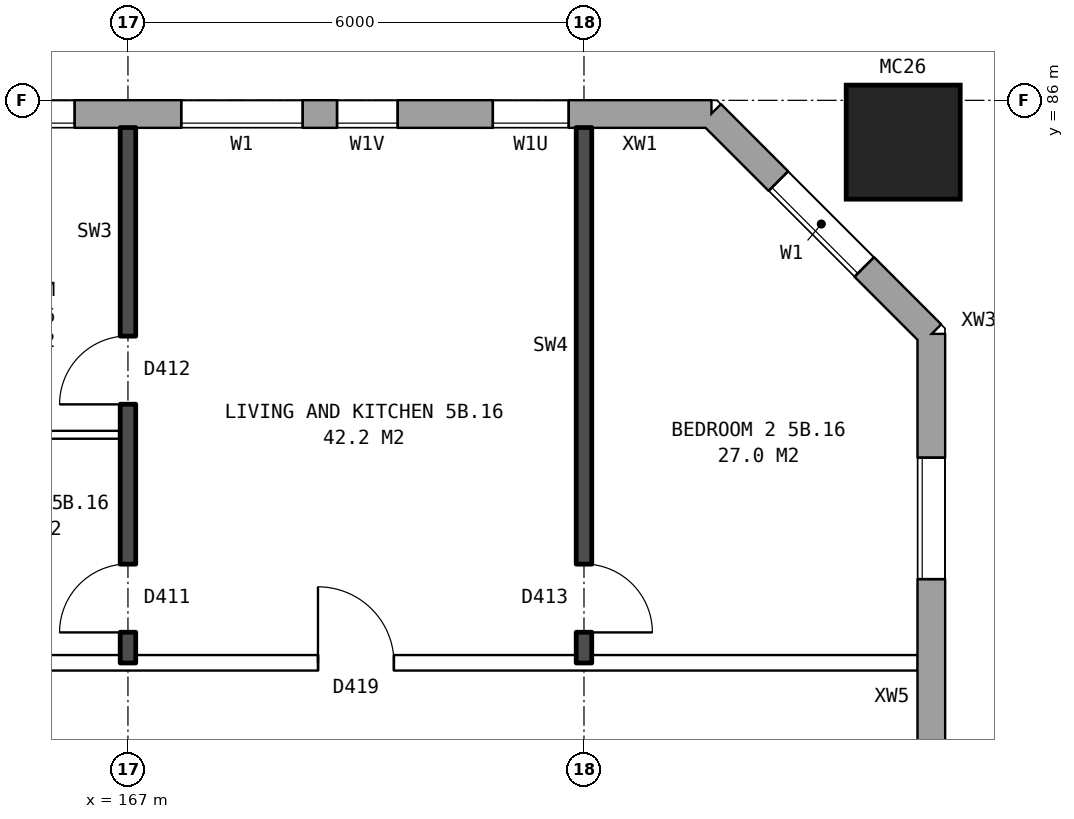
"""IFC4 building model, lengths in metres.
Left out: names, types, materials, properties, quantities, classifications, styles, units other than length and angle.
Written with IfcOpenShell. Run it as: python <this file> out.ifc"""

import sys

from ifc_helpers import new_model, si_unit, direction, frame, frame_2d, origin, origin_2d, place, context, subcontext, project, spatial, rectangle, hollow_rectangle, extrude, element, fill, save


model = new_model("IFC4")
c1 = context("Model", 3, precision=1e-05, world=origin(), true_north=direction((0.0, 1.0)))
c2 = subcontext(c1, "Body", "Model", "MODEL_VIEW")
j1 = project(units=[si_unit("LENGTHUNIT", "METRE"), si_unit("PLANEANGLEUNIT", "RADIAN")], contexts=[c1])
p1 = place(None, origin())
s1 = spatial("IfcSite", under=j1, at=p1, CompositionType="ELEMENT")
p2 = place(p1, origin())
s2 = spatial("IfcBuilding", under=s1, at=p2, CompositionType="ELEMENT")
p3 = place(p2, frame((0.0, 0.0, 22.6)))
s3 = spatial("IfcBuildingStorey", under=s2, at=p3, CompositionType="ELEMENT", Elevation=22.6)
p4 = place(p3, frame((177.2, 85.45, 0.0), z_axis=(0.0, 0.0, 1.0), x_axis=(1.0, 0.0, 0.0)))
e1 = element("IfcColumn", 1, at=p4, inside=s3, PredefinedType="COLUMN", context=c2, shape_type="SweptSolid", body=[
    extrude(hollow_rectangle(XDim=1.5, YDim=1.5, WallThickness=0.08, at=origin_2d()), origin(), (0.0, 0.0, 1.0), 3.1),
])
p5 = place(p3, frame((177.57, 57.075, 0.0), z_axis=(0.0, 0.0, 1.0), x_axis=(0.0, 1.0, 0.0)))
e2 = element("IfcWall", 2, at=p5, inside=s3, PredefinedType="STANDARD", context=c2, shape_type="SweptSolid", body=[
    extrude(rectangle(XDim=25.851, YDim=0.36, at=frame_2d((12.925, 0.0))), origin(), (0.0, 0.0, 1.0), 2.85),
])
p6 = place(p5, frame((1.625, 0.0, 0.8)))
e3 = element("IfcOpeningElement", 3, at=p6, cuts=e2, PredefinedType="OPENING", context=c2, shape_type="SweptSolid", body=[
    extrude(rectangle(XDim=1.6, YDim=1.8, at=frame_2d((0.8, 0.9))), frame((0.0, 0.19, 0.0), z_axis=(0.0, -1.0, 0.0), x_axis=(1.0, 0.0, 0.0)), (0.0, 0.0, 1.0), 0.38),
])
p7 = place(p5, frame((6.225, 0.0, 0.8)))
e4 = element("IfcOpeningElement", 4, at=p7, cuts=e2, PredefinedType="OPENING", context=c2, shape_type="SweptSolid", body=[
    extrude(rectangle(XDim=1.0, YDim=0.9, at=frame_2d((0.5, 0.45))), frame((0.0, 0.19, 0.0), z_axis=(0.0, -1.0, 0.0), x_axis=(1.0, 0.0, 0.0)), (0.0, 0.0, 1.0), 0.38),
])
p8 = place(p5, frame((7.625, 0.0, 0.8)))
e5 = element("IfcOpeningElement", 5, at=p8, cuts=e2, PredefinedType="OPENING", context=c2, shape_type="SweptSolid", body=[
    extrude(rectangle(XDim=1.6, YDim=1.8, at=frame_2d((0.8, 0.9))), frame((0.0, 0.19, 0.0), z_axis=(0.0, -1.0, 0.0), x_axis=(1.0, 0.0, 0.0)), (0.0, 0.0, 1.0), 0.38),
])
p9 = place(p5, frame((10.625, 0.0, 0.8)))
e6 = element("IfcOpeningElement", 6, at=p9, cuts=e2, PredefinedType="OPENING", context=c2, shape_type="SweptSolid", body=[
    extrude(rectangle(XDim=1.6, YDim=1.8, at=frame_2d((0.8, 0.9))), frame((0.0, 0.19, 0.0), z_axis=(0.0, -1.0, 0.0), x_axis=(1.0, 0.0, 0.0)), (0.0, 0.0, 1.0), 0.38),
])
p10 = place(p5, frame((13.625, 0.0, 0.8)))
e7 = element("IfcOpeningElement", 7, at=p10, cuts=e2, PredefinedType="OPENING", context=c2, shape_type="SweptSolid", body=[
    extrude(rectangle(XDim=1.6, YDim=1.8, at=frame_2d((0.8, 0.9))), frame((0.0, 0.19, 0.0), z_axis=(0.0, -1.0, 0.0), x_axis=(1.0, 0.0, 0.0)), (0.0, 0.0, 1.0), 0.38),
])
p11 = place(p5, frame((16.625, 0.0, 0.8)))
e8 = element("IfcOpeningElement", 8, at=p11, cuts=e2, PredefinedType="OPENING", context=c2, shape_type="SweptSolid", body=[
    extrude(rectangle(XDim=1.6, YDim=1.8, at=frame_2d((0.8, 0.9))), frame((0.0, 0.19, 0.0), z_axis=(0.0, -1.0, 0.0), x_axis=(1.0, 0.0, 0.0)), (0.0, 0.0, 1.0), 0.38),
])
p12 = place(p5, frame((9.525, 0.0, 0.8)))
e9 = element("IfcOpeningElement", 9, at=p12, cuts=e2, PredefinedType="OPENING", context=c2, shape_type="SweptSolid", body=[
    extrude(rectangle(XDim=0.8, YDim=1.8, at=frame_2d((0.4, 0.9))), frame((0.0, 0.19, 0.0), z_axis=(0.0, -1.0, 0.0), x_axis=(1.0, 0.0, 0.0)), (0.0, 0.0, 1.0), 0.38),
])
p13 = place(p5, frame((22.625, 0.0, 0.8)))
e10 = element("IfcOpeningElement", 10, at=p13, cuts=e2, PredefinedType="OPENING", context=c2, shape_type="SweptSolid", body=[
    extrude(rectangle(XDim=1.6, YDim=1.8, at=frame_2d((0.8, 0.9))), frame((0.0, 0.19, 0.0), z_axis=(0.0, -1.0, 0.0), x_axis=(1.0, 0.0, 0.0)), (0.0, 0.0, 1.0), 0.38),
])
p14 = place(p5, frame((12.525, 0.0, 0.8)))
e11 = element("IfcOpeningElement", 11, at=p14, cuts=e2, PredefinedType="OPENING", context=c2, shape_type="SweptSolid", body=[
    extrude(rectangle(XDim=0.8, YDim=1.8, at=frame_2d((0.4, 0.9))), frame((0.0, 0.19, 0.0), z_axis=(0.0, -1.0, 0.0), x_axis=(1.0, 0.0, 0.0)), (0.0, 0.0, 1.0), 0.38),
])
p15 = place(p5, frame((15.525, 0.0, 0.8)))
e12 = element("IfcOpeningElement", 12, at=p15, cuts=e2, PredefinedType="OPENING", context=c2, shape_type="SweptSolid", body=[
    extrude(rectangle(XDim=0.8, YDim=1.8, at=frame_2d((0.4, 0.9))), frame((0.0, 0.19, 0.0), z_axis=(0.0, -1.0, 0.0), x_axis=(1.0, 0.0, 0.0)), (0.0, 0.0, 1.0), 0.38),
])
p16 = place(p5, frame((18.525, 0.0, 0.8)))
e13 = element("IfcOpeningElement", 13, at=p16, cuts=e2, PredefinedType="OPENING", context=c2, shape_type="SweptSolid", body=[
    extrude(rectangle(XDim=1.0, YDim=0.9, at=frame_2d((0.5, 0.45))), frame((0.0, 0.19, 0.0), z_axis=(0.0, -1.0, 0.0), x_axis=(1.0, 0.0, 0.0)), (0.0, 0.0, 1.0), 0.38),
])
p17 = place(p3, frame((177.57, 82.925, 0.0), z_axis=(0.0, 0.0, 1.0), x_axis=(-0.707106781187, 0.707106781187, 0.0)))
e14 = element("IfcWall", 14, at=p17, inside=s3, PredefinedType="STANDARD", context=c2, shape_type="SweptSolid", body=[
    extrude(rectangle(XDim=4.094, YDim=0.36, at=frame_2d((2.047, 0.0))), origin(), (0.0, 0.0, 1.0), 2.85),
])
p18 = place(p17, frame((1.247, 0.0, 0.8)))
e15 = element("IfcOpeningElement", 15, at=p18, cuts=e14, PredefinedType="OPENING", context=c2, shape_type="SweptSolid", body=[
    extrude(rectangle(XDim=1.6, YDim=1.8, at=frame_2d((0.8, 0.9))), frame((0.0, 0.19, 0.0), z_axis=(0.0, -1.0, 0.0), x_axis=(1.0, 0.0, 0.0)), (0.0, 0.0, 1.0), 0.38),
])
p19 = place(p3, frame((174.675, 85.82, 0.0), z_axis=(0.0, 0.0, 1.0), x_axis=(-1.0, 0.0, 0.0)))
e16 = element("IfcWall", 16, at=p19, inside=s3, PredefinedType="STANDARD", context=c2, shape_type="SweptSolid", body=[
    extrude(rectangle(XDim=40.601, YDim=0.36, at=frame_2d((20.3, 0.0))), origin(), (0.0, 0.0, 1.0), 2.85),
])
p20 = place(p19, frame((1.875, 0.0, 1.7)))
e17 = element("IfcOpeningElement", 17, at=p20, cuts=e16, PredefinedType="OPENING", context=c2, shape_type="SweptSolid", body=[
    extrude(rectangle(XDim=1.0, YDim=0.9, at=frame_2d((0.5, 0.45))), frame((0.0, 0.19, 0.0), z_axis=(0.0, -1.0, 0.0), x_axis=(1.0, 0.0, 0.0)), (0.0, 0.0, 1.0), 0.38),
])
p21 = place(p19, frame((5.375, 0.0, 0.8)))
e18 = element("IfcOpeningElement", 18, at=p21, cuts=e16, PredefinedType="OPENING", context=c2, shape_type="SweptSolid", body=[
    extrude(rectangle(XDim=1.6, YDim=1.8, at=frame_2d((0.8, 0.9))), frame((0.0, 0.19, 0.0), z_axis=(0.0, -1.0, 0.0), x_axis=(1.0, 0.0, 0.0)), (0.0, 0.0, 1.0), 0.38),
])
p22 = place(p19, frame((8.375, 0.0, 0.8)))
e19 = element("IfcOpeningElement", 19, at=p22, cuts=e16, PredefinedType="OPENING", context=c2, shape_type="SweptSolid", body=[
    extrude(rectangle(XDim=1.6, YDim=1.8, at=frame_2d((0.8, 0.9))), frame((0.0, 0.19, 0.0), z_axis=(0.0, -1.0, 0.0), x_axis=(1.0, 0.0, 0.0)), (0.0, 0.0, 1.0), 0.38),
])
p23 = place(p19, frame((11.375, 0.0, 0.8)))
e20 = element("IfcOpeningElement", 20, at=p23, cuts=e16, PredefinedType="OPENING", context=c2, shape_type="SweptSolid", body=[
    extrude(rectangle(XDim=1.6, YDim=1.8, at=frame_2d((0.8, 0.9))), frame((0.0, 0.19, 0.0), z_axis=(0.0, -1.0, 0.0), x_axis=(1.0, 0.0, 0.0)), (0.0, 0.0, 1.0), 0.38),
])
p24 = place(p19, frame((14.375, 0.0, 0.8)))
e21 = element("IfcOpeningElement", 21, at=p24, cuts=e16, PredefinedType="OPENING", context=c2, shape_type="SweptSolid", body=[
    extrude(rectangle(XDim=1.6, YDim=1.8, at=frame_2d((0.8, 0.9))), frame((0.0, 0.19, 0.0), z_axis=(0.0, -1.0, 0.0), x_axis=(1.0, 0.0, 0.0)), (0.0, 0.0, 1.0), 0.38),
])
p25 = place(p19, frame((17.375, 0.0, 0.8)))
e22 = element("IfcOpeningElement", 22, at=p25, cuts=e16, PredefinedType="OPENING", context=c2, shape_type="SweptSolid", body=[
    extrude(rectangle(XDim=1.6, YDim=1.8, at=frame_2d((0.8, 0.9))), frame((0.0, 0.19, 0.0), z_axis=(0.0, -1.0, 0.0), x_axis=(1.0, 0.0, 0.0)), (0.0, 0.0, 1.0), 0.38),
])
p26 = place(p19, frame((20.375, 0.0, 0.8)))
e23 = element("IfcOpeningElement", 23, at=p26, cuts=e16, PredefinedType="OPENING", context=c2, shape_type="SweptSolid", body=[
    extrude(rectangle(XDim=1.6, YDim=1.8, at=frame_2d((0.8, 0.9))), frame((0.0, 0.19, 0.0), z_axis=(0.0, -1.0, 0.0), x_axis=(1.0, 0.0, 0.0)), (0.0, 0.0, 1.0), 0.38),
])
p27 = place(p19, frame((23.375, 0.0, 0.8)))
e24 = element("IfcOpeningElement", 24, at=p27, cuts=e16, PredefinedType="OPENING", context=c2, shape_type="SweptSolid", body=[
    extrude(rectangle(XDim=1.6, YDim=1.8, at=frame_2d((0.8, 0.9))), frame((0.0, 0.19, 0.0), z_axis=(0.0, -1.0, 0.0), x_axis=(1.0, 0.0, 0.0)), (0.0, 0.0, 1.0), 0.38),
])
p28 = place(p19, frame((26.375, 0.0, 0.8)))
e25 = element("IfcOpeningElement", 25, at=p28, cuts=e16, PredefinedType="OPENING", context=c2, shape_type="SweptSolid", body=[
    extrude(rectangle(XDim=1.6, YDim=1.8, at=frame_2d((0.8, 0.9))), frame((0.0, 0.19, 0.0), z_axis=(0.0, -1.0, 0.0), x_axis=(1.0, 0.0, 0.0)), (0.0, 0.0, 1.0), 0.38),
])
p29 = place(p19, frame((29.375, 0.0, 0.8)))
e26 = element("IfcOpeningElement", 26, at=p29, cuts=e16, PredefinedType="OPENING", context=c2, shape_type="SweptSolid", body=[
    extrude(rectangle(XDim=1.6, YDim=1.8, at=frame_2d((0.8, 0.9))), frame((0.0, 0.19, 0.0), z_axis=(0.0, -1.0, 0.0), x_axis=(1.0, 0.0, 0.0)), (0.0, 0.0, 1.0), 0.38),
])
p30 = place(p19, frame((32.375, 0.0, 0.8)))
e27 = element("IfcOpeningElement", 27, at=p30, cuts=e16, PredefinedType="OPENING", context=c2, shape_type="SweptSolid", body=[
    extrude(rectangle(XDim=1.6, YDim=1.8, at=frame_2d((0.8, 0.9))), frame((0.0, 0.19, 0.0), z_axis=(0.0, -1.0, 0.0), x_axis=(1.0, 0.0, 0.0)), (0.0, 0.0, 1.0), 0.38),
])
p31 = place(p19, frame((34.275, 0.0, 0.8)))
e28 = element("IfcOpeningElement", 28, at=p31, cuts=e16, PredefinedType="OPENING", context=c2, shape_type="SweptSolid", body=[
    extrude(rectangle(XDim=1.0, YDim=1.8, at=frame_2d((0.5, 0.9))), frame((0.0, 0.19, 0.0), z_axis=(0.0, -1.0, 0.0), x_axis=(1.0, 0.0, 0.0)), (0.0, 0.0, 1.0), 0.38),
])
p32 = place(p19, frame((37.875, 0.0, 1.6)))
e29 = element("IfcOpeningElement", 29, at=p32, cuts=e16, PredefinedType="OPENING", context=c2, shape_type="SweptSolid", body=[
    extrude(rectangle(XDim=0.6, YDim=0.9, at=frame_2d((0.3, 0.45))), frame((0.0, 0.19, 0.0), z_axis=(0.0, -1.0, 0.0), x_axis=(1.0, 0.0, 0.0)), (0.0, 0.0, 1.0), 0.38),
])
p33 = place(p19, frame((4.125, 0.0, 0.8)))
e30 = element("IfcOpeningElement", 30, at=p33, cuts=e16, PredefinedType="OPENING", context=c2, shape_type="SweptSolid", body=[
    extrude(rectangle(XDim=0.8, YDim=0.9, at=frame_2d((0.4, 0.45))), frame((0.0, 0.19, 0.0), z_axis=(0.0, -1.0, 0.0), x_axis=(1.0, 0.0, 0.0)), (0.0, 0.0, 1.0), 0.38),
])
p34 = place(p19, frame((35.575, 0.0, 0.8)))
e31 = element("IfcOpeningElement", 31, at=p34, cuts=e16, PredefinedType="OPENING", context=c2, shape_type="SweptSolid", body=[
    extrude(rectangle(XDim=0.8, YDim=0.9, at=frame_2d((0.4, 0.45))), frame((0.0, 0.19, 0.0), z_axis=(0.0, -1.0, 0.0), x_axis=(1.0, 0.0, 0.0)), (0.0, 0.0, 1.0), 0.38),
])
p35 = place(p19, frame((38.875, 0.0, 0.8)))
e32 = element("IfcOpeningElement", 32, at=p35, cuts=e16, PredefinedType="OPENING", context=c2, shape_type="SweptSolid", body=[
    extrude(rectangle(XDim=1.4, YDim=1.8, at=frame_2d((0.7, 0.9))), frame((0.0, 0.19, 0.0), z_axis=(0.0, -1.0, 0.0), x_axis=(1.0, 0.0, 0.0)), (0.0, 0.0, 1.0), 0.38),
])
p36 = place(p3, frame((155.1, 78.6, 0.0), z_axis=(0.0, 0.0, 1.0), x_axis=(1.0, 0.0, 0.0)))
e33 = element("IfcWall", 33, at=p36, inside=s3, PredefinedType="PARTITIONING", context=c2, shape_type="SweptSolid", body=[
    extrude(rectangle(XDim=22.29, YDim=0.2, at=frame_2d((11.145, 0.0))), origin(), (0.0, 0.0, 1.0), 2.85),
])
p37 = place(p36, frame((2.45, 0.0, 0.0)))
e34 = element("IfcOpeningElement", 34, at=p37, cuts=e33, PredefinedType="OPENING", context=c2, shape_type="SweptSolid", body=[
    extrude(rectangle(XDim=1.0, YDim=2.1, at=frame_2d((0.5, 1.05))), frame((0.0, 0.11, 0.0), z_axis=(0.0, -1.0, 0.0), x_axis=(1.0, 0.0, 0.0)), (0.0, 0.0, 1.0), 0.22),
])
p38 = place(p36, frame((14.4, 0.0, 0.0)))
e35 = element("IfcOpeningElement", 35, at=p38, cuts=e33, PredefinedType="OPENING", context=c2, shape_type="SweptSolid", body=[
    extrude(rectangle(XDim=1.0, YDim=2.1, at=frame_2d((0.5, 1.05))), frame((0.0, 0.11, 0.0), z_axis=(0.0, -1.0, 0.0), x_axis=(1.0, 0.0, 0.0)), (0.0, 0.0, 1.0), 0.22),
])
p39 = place(p3, frame((164.1, 81.6, 0.0), z_axis=(0.0, 0.0, 1.0), x_axis=(1.0, 0.0, 0.0)))
e36 = element("IfcWall", 36, at=p39, inside=s3, PredefinedType="PARTITIONING", context=c2, shape_type="SweptSolid", body=[
    extrude(rectangle(XDim=2.8, YDim=0.1, at=frame_2d((1.4, 0.0))), origin(), (0.0, 0.0, 1.0), 2.85),
])
p40 = place(p3, frame((167.0, 78.6, 0.0), z_axis=(0.0, 0.0, 1.0), x_axis=(0.0, 1.0, 0.0)))
e37 = element("IfcWall", 37, at=p40, inside=s3, PredefinedType="SOLIDWALL", context=c2, shape_type="SweptSolid", body=[
    extrude(rectangle(XDim=7.04, YDim=0.2, at=frame_2d((3.52, 0.0))), origin(), (0.0, 0.0, 1.0), 2.85),
])
p41 = place(p40, frame((3.4, 0.0, 0.0)))
e38 = element("IfcOpeningElement", 38, at=p41, cuts=e37, PredefinedType="OPENING", context=c2, shape_type="SweptSolid", body=[
    extrude(rectangle(XDim=0.9, YDim=2.1, at=frame_2d((0.45, 1.05))), frame((0.0, 0.11, 0.0), z_axis=(0.0, -1.0, 0.0), x_axis=(1.0, 0.0, 0.0)), (0.0, 0.0, 1.0), 0.22),
])
p42 = place(p40, frame((0.4, 0.0, 0.0)))
e39 = element("IfcOpeningElement", 39, at=p42, cuts=e37, PredefinedType="OPENING", context=c2, shape_type="SweptSolid", body=[
    extrude(rectangle(XDim=0.9, YDim=2.1, at=frame_2d((0.45, 1.05))), frame((0.0, 0.11, 0.0), z_axis=(0.0, -1.0, 0.0), x_axis=(1.0, 0.0, 0.0)), (0.0, 0.0, 1.0), 0.22),
])
p43 = place(p3, frame((173.0, 78.6, 0.0), z_axis=(0.0, 0.0, 1.0), x_axis=(0.0, 1.0, 0.0)))
e40 = element("IfcWall", 40, at=p43, inside=s3, PredefinedType="SOLIDWALL", context=c2, shape_type="SweptSolid", body=[
    extrude(rectangle(XDim=7.04, YDim=0.2, at=frame_2d((3.52, 0.0))), origin(), (0.0, 0.0, 1.0), 2.85),
])
p44 = place(p43, frame((0.4, 0.0, 0.0)))
e41 = element("IfcOpeningElement", 41, at=p44, cuts=e40, PredefinedType="OPENING", context=c2, shape_type="SweptSolid", body=[
    extrude(rectangle(XDim=0.9, YDim=2.1, at=frame_2d((0.45, 1.05))), frame((0.0, 0.11, 0.0), z_axis=(0.0, -1.0, 0.0), x_axis=(1.0, 0.0, 0.0)), (0.0, 0.0, 1.0), 0.22),
])
p45 = place(p13, origin())
e42 = element("IfcWindow", 42, at=p45, inside=s3, PartitioningType="SINGLE_PANEL", PredefinedType="WINDOW", context=c2, shape_type="SweptSolid", body=[
    extrude(rectangle(XDim=1.6, YDim=1.8, at=frame_2d((0.8, 0.9))), frame((0.0, 0.15, 0.0), z_axis=(0.0, -1.0, 0.0), x_axis=(1.0, 0.0, 0.0)), (0.0, 0.0, 1.0), 0.06),
])
fill(e10, e42)
p46 = place(p18, origin())
e43 = element("IfcWindow", 43, at=p46, inside=s3, PartitioningType="SINGLE_PANEL", PredefinedType="WINDOW", context=c2, shape_type="SweptSolid", body=[
    extrude(rectangle(XDim=1.6, YDim=1.8, at=frame_2d((0.8, 0.9))), frame((0.0, 0.15, 0.0), z_axis=(0.0, -1.0, 0.0), x_axis=(1.0, 0.0, 0.0)), (0.0, 0.0, 1.0), 0.06),
])
fill(e15, e43)
p47 = place(p20, origin())
e44 = element("IfcWindow", 44, at=p47, inside=s3, PartitioningType="SINGLE_PANEL", PredefinedType="WINDOW", context=c2, shape_type="SweptSolid", body=[
    extrude(rectangle(XDim=1.0, YDim=0.9, at=frame_2d((0.5, 0.45))), frame((0.0, 0.15, 0.0), z_axis=(0.0, -1.0, 0.0), x_axis=(1.0, 0.0, 0.0)), (0.0, 0.0, 1.0), 0.06),
])
fill(e17, e44)
p48 = place(p21, origin())
e45 = element("IfcWindow", 45, at=p48, inside=s3, PartitioningType="SINGLE_PANEL", PredefinedType="WINDOW", context=c2, shape_type="SweptSolid", body=[
    extrude(rectangle(XDim=1.6, YDim=1.8, at=frame_2d((0.8, 0.9))), frame((0.0, 0.15, 0.0), z_axis=(0.0, -1.0, 0.0), x_axis=(1.0, 0.0, 0.0)), (0.0, 0.0, 1.0), 0.06),
])
fill(e18, e45)
p49 = place(p22, origin())
e46 = element("IfcWindow", 46, at=p49, inside=s3, PartitioningType="SINGLE_PANEL", PredefinedType="WINDOW", context=c2, shape_type="SweptSolid", body=[
    extrude(rectangle(XDim=1.6, YDim=1.8, at=frame_2d((0.8, 0.9))), frame((0.0, 0.15, 0.0), z_axis=(0.0, -1.0, 0.0), x_axis=(1.0, 0.0, 0.0)), (0.0, 0.0, 1.0), 0.06),
])
fill(e19, e46)
p50 = place(p41, origin())
e47 = element("IfcDoor", 47, at=p50, inside=s3, OperationType="SINGLE_SWING_LEFT", PredefinedType="DOOR", context=c2, shape_type="SweptSolid", body=[
    extrude(rectangle(XDim=0.9, YDim=2.1, at=frame_2d((0.45, 1.05))), frame((0.0, 0.025, 0.0), z_axis=(0.0, -1.0, 0.0), x_axis=(1.0, 0.0, 0.0)), (0.0, 0.0, 1.0), 0.05),
])
fill(e38, e47)
p51 = place(p44, frame((0.9, 0.0, 0.0), z_axis=(0.0, 0.0, 1.0), x_axis=(-1.0, 0.0, 0.0)))
e48 = element("IfcDoor", 48, at=p51, inside=s3, OperationType="SINGLE_SWING_RIGHT", PredefinedType="DOOR", context=c2, shape_type="SweptSolid", body=[
    extrude(rectangle(XDim=0.9, YDim=2.1, at=frame_2d((0.45, 1.05))), frame((0.0, 0.025, 0.0), z_axis=(0.0, -1.0, 0.0), x_axis=(1.0, 0.0, 0.0)), (0.0, 0.0, 1.0), 0.05),
])
fill(e41, e48)
p52 = place(p38, origin())
e49 = element("IfcDoor", 49, at=p52, inside=s3, OperationType="SINGLE_SWING_LEFT", PredefinedType="DOOR", context=c2, shape_type="SweptSolid", body=[
    extrude(rectangle(XDim=1.0, YDim=2.1, at=frame_2d((0.5, 1.05))), frame((0.0, 0.025, 0.0), z_axis=(0.0, -1.0, 0.0), x_axis=(1.0, 0.0, 0.0)), (0.0, 0.0, 1.0), 0.05),
])
fill(e35, e49)
p53 = place(p42, origin())
e50 = element("IfcDoor", 50, at=p53, inside=s3, OperationType="SINGLE_SWING_LEFT", PredefinedType="DOOR", context=c2, shape_type="SweptSolid", body=[
    extrude(rectangle(XDim=0.9, YDim=2.1, at=frame_2d((0.45, 1.05))), frame((0.0, 0.025, 0.0), z_axis=(0.0, -1.0, 0.0), x_axis=(1.0, 0.0, 0.0)), (0.0, 0.0, 1.0), 0.05),
])
fill(e39, e50)
p54 = place(p33, origin())
e51 = element("IfcWindow", 51, at=p54, inside=s3, PartitioningType="SINGLE_PANEL", PredefinedType="WINDOW", context=c2, shape_type="SweptSolid", body=[
    extrude(rectangle(XDim=0.8, YDim=0.9, at=frame_2d((0.4, 0.45))), frame((0.0, 0.15, 0.0), z_axis=(0.0, -1.0, 0.0), x_axis=(1.0, 0.0, 0.0)), (0.0, 0.0, 1.0), 0.06),
])
fill(e30, e51)
save(model, sys.argv[1])
